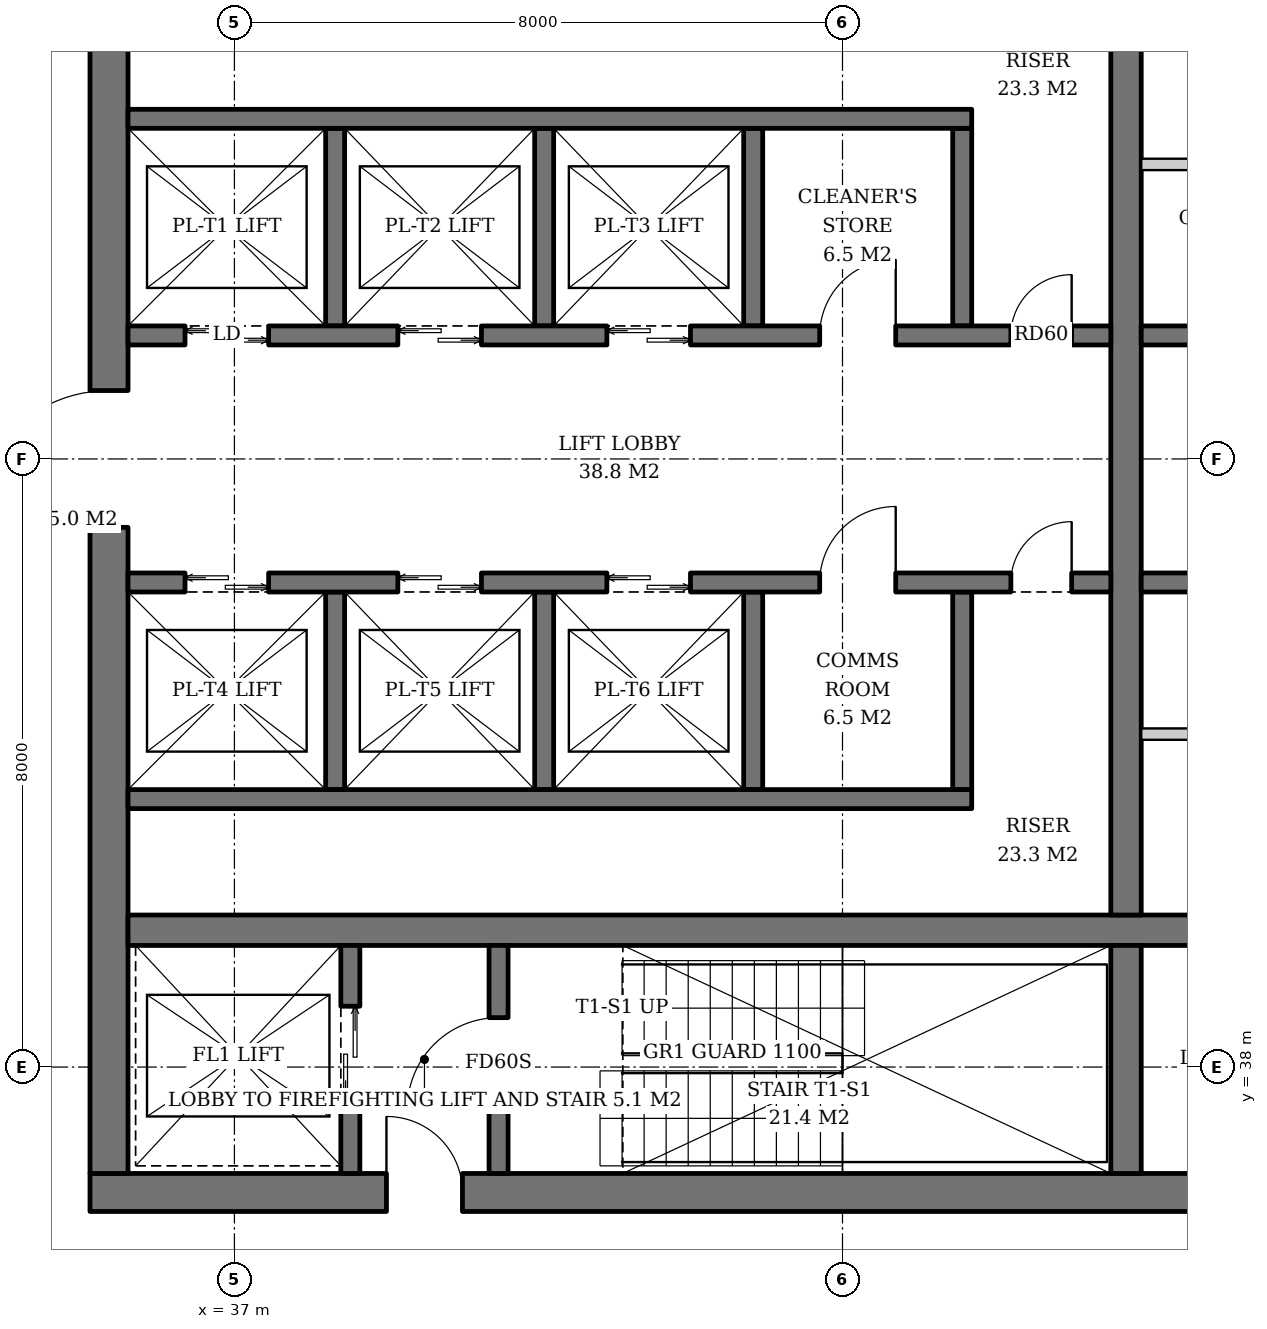
"""IFC4 building model, lengths in metres.
Left out: names, types, materials, properties, quantities, classifications, styles, units other than length and angle.
Written with IfcOpenShell. Run it as: python <this file> out.ifc"""

import sys

from ifc_helpers import new_model, si_unit, direction, frame, frame_2d, origin, place, context, subcontext, project, spatial, rectangle, extrude, element, fill, save


model = new_model("IFC4")
c1 = context("Model", 3, precision=1e-05, world=origin(), true_north=direction((0.0, 1.0)))
c2 = subcontext(c1, "Body", "Model", "MODEL_VIEW")
j1 = project(units=[si_unit("LENGTHUNIT", "METRE"), si_unit("PLANEANGLEUNIT", "RADIAN")], contexts=[c1])
p1 = place(None, origin())
s1 = spatial("IfcSite", under=j1, at=p1, CompositionType="ELEMENT")
p2 = place(p1, origin())
s2 = spatial("IfcBuilding", under=s1, at=p2, CompositionType="ELEMENT")
p3 = place(p2, frame((0.0, 0.0, 283.2)))
s3 = spatial("IfcBuildingStorey", under=s2, at=p3, CompositionType="ELEMENT", Elevation=283.2)
p4 = place(p3, frame((35.1, 36.35, 0.0), z_axis=(0.0, 0.0, 1.0), x_axis=(1.0, 0.0, 0.0)))
e1 = element("IfcWall", 1, at=p4, inside=s3, PredefinedType="SHEAR", context=c2, shape_type="SweptSolid", body=[
    extrude(rectangle(XDim=19.8, YDim=0.5, at=frame_2d((9.9, 0.0))), origin(), (0.0, 0.0, 1.0), 3.8),
])
p5 = place(p4, frame((3.9, 0.0, 0.0)))
e2 = element("IfcOpeningElement", 2, at=p5, cuts=e1, PredefinedType="OPENING", context=c2, shape_type="SweptSolid", body=[
    extrude(rectangle(XDim=1.0, YDim=2.1, at=frame_2d((0.5, 1.05))), frame((0.0, 0.26, 0.0), z_axis=(0.0, -1.0, 0.0), x_axis=(1.0, 0.0, 0.0)), (0.0, 0.0, 1.0), 0.52),
])
p6 = place(p4, frame((15.35, 0.0, 0.0)))
e3 = element("IfcOpeningElement", 3, at=p6, cuts=e1, PredefinedType="OPENING", context=c2, shape_type="SweptSolid", body=[
    extrude(rectangle(XDim=1.0, YDim=2.1, at=frame_2d((0.5, 1.05))), frame((0.0, 0.26, 0.0), z_axis=(0.0, -1.0, 0.0), x_axis=(1.0, 0.0, 0.0)), (0.0, 0.0, 1.0), 0.52),
])
p7 = place(p3, frame((35.35, 36.6, 0.0), z_axis=(0.0, 0.0, 1.0), x_axis=(0.0, 1.0, 0.0)))
e4 = element("IfcWall", 4, at=p7, inside=s3, PredefinedType="SHEAR", context=c2, shape_type="SweptSolid", body=[
    extrude(rectangle(XDim=18.8, YDim=0.5, at=frame_2d((9.4, 0.0))), origin(), (0.0, 0.0, 1.0), 3.8),
])
p8 = place(p7, frame((8.5, 0.0, 0.0)))
e5 = element("IfcOpeningElement", 5, at=p8, cuts=e4, PredefinedType="OPENING", context=c2, shape_type="SweptSolid", body=[
    extrude(rectangle(XDim=1.8, YDim=2.4, at=frame_2d((0.9, 1.2))), frame((0.0, 0.26, 0.0), z_axis=(0.0, -1.0, 0.0), x_axis=(1.0, 0.0, 0.0)), (0.0, 0.0, 1.0), 0.52),
])
p9 = place(p3, frame((35.6, 39.8, 0.0), z_axis=(0.0, 0.0, 1.0), x_axis=(1.0, 0.0, 0.0)))
e6 = element("IfcWall", 6, at=p9, inside=s3, PredefinedType="SHEAR", context=c2, shape_type="SweptSolid", body=[
    extrude(rectangle(XDim=18.8, YDim=0.4, at=frame_2d((9.4, 0.0))), origin(), (0.0, 0.0, 1.0), 3.8),
])
p10 = place(p3, frame((48.73, 36.6, 0.0), z_axis=(0.0, 0.0, 1.0), x_axis=(0.0, 1.0, 0.0)))
e7 = element("IfcWall", 7, at=p10, inside=s3, PredefinedType="SHEAR", context=c2, shape_type="SweptSolid", body=[
    extrude(rectangle(XDim=3.0, YDim=0.4, at=frame_2d((1.5, 0.0))), origin(), (0.0, 0.0, 1.0), 3.8),
])
p11 = place(p3, frame((48.73, 40.0, 0.0), z_axis=(0.0, 0.0, 1.0), x_axis=(0.0, 1.0, 0.0)))
e8 = element("IfcWall", 8, at=p11, inside=s3, PredefinedType="SHEAR", context=c2, shape_type="SweptSolid", body=[
    extrude(rectangle(XDim=12.0, YDim=0.4, at=frame_2d((6.0, 0.0))), origin(), (0.0, 0.0, 1.0), 3.8),
])
p12 = place(p3, frame((38.525, 36.6, 0.0), z_axis=(0.0, 0.0, 1.0), x_axis=(0.0, 1.0, 0.0)))
e9 = element("IfcWall", 9, at=p12, inside=s3, PredefinedType="SHEAR", context=c2, shape_type="SweptSolid", body=[
    extrude(rectangle(XDim=3.0, YDim=0.25, at=frame_2d((1.5, 0.0))), origin(), (0.0, 0.0, 1.0), 3.8),
])
p13 = place(p12, frame((0.9, 0.0, 0.0)))
e10 = element("IfcOpeningElement", 10, at=p13, cuts=e9, PredefinedType="OPENING", context=c2, shape_type="SweptSolid", body=[
    extrude(rectangle(XDim=1.3, YDim=2.2, at=frame_2d((0.65, 1.1))), frame((0.0, 0.135, 0.0), z_axis=(0.0, -1.0, 0.0), x_axis=(1.0, 0.0, 0.0)), (0.0, 0.0, 1.0), 0.27),
])
p14 = place(p3, frame((40.475, 36.6, 0.0), z_axis=(0.0, 0.0, 1.0), x_axis=(0.0, 1.0, 0.0)))
e11 = element("IfcWall", 11, at=p14, inside=s3, PredefinedType="SHEAR", context=c2, shape_type="SweptSolid", body=[
    extrude(rectangle(XDim=3.0, YDim=0.25, at=frame_2d((1.5, 0.0))), origin(), (0.0, 0.0, 1.0), 3.8),
])
p15 = place(p14, frame((0.85, 0.0, 0.0)))
e12 = element("IfcOpeningElement", 12, at=p15, cuts=e11, PredefinedType="OPENING", context=c2, shape_type="SweptSolid", body=[
    extrude(rectangle(XDim=1.2, YDim=2.1, at=frame_2d((0.6, 1.05))), frame((0.0, 0.135, 0.0), z_axis=(0.0, -1.0, 0.0), x_axis=(1.0, 0.0, 0.0)), (0.0, 0.0, 1.0), 0.27),
])
for number, where, z_axis, x_axis in (
    (13, (38.325, 47.75, 0.0), (0.0, 0.0, 1.0), (0.0, 1.0, 0.0)),
    (14, (41.075, 47.75, 0.0), (0.0, 0.0, 1.0), (0.0, 1.0, 0.0)),
    (15, (43.825, 47.75, 0.0), (0.0, 0.0, 1.0), (0.0, 1.0, 0.0)),
    (16, (46.575, 47.75, 0.0), (0.0, 0.0, 1.0), (0.0, 1.0, 0.0)),
):
    element("IfcWall", number, at=place(p3, frame(where, z_axis=z_axis, x_axis=x_axis)), inside=s3, PredefinedType="SHEAR", context=c2, shape_type="SweptSolid", body=[
        extrude(rectangle(XDim=2.6, YDim=0.25, at=frame_2d((1.3, 0.0))), origin(), (0.0, 0.0, 1.0), 3.8),
    ])
p16 = place(p3, frame((35.6, 50.475, 0.0), z_axis=(0.0, 0.0, 1.0), x_axis=(1.0, 0.0, 0.0)))
e17 = element("IfcWall", 17, at=p16, inside=s3, PredefinedType="SHEAR", context=c2, shape_type="SweptSolid", body=[
    extrude(rectangle(XDim=11.1, YDim=0.25, at=frame_2d((5.55, 0.0))), origin(), (0.0, 0.0, 1.0), 3.8),
])
p17 = place(p3, frame((35.6, 47.625, 0.0), z_axis=(0.0, 0.0, 1.0), x_axis=(1.0, 0.0, 0.0)))
e18 = element("IfcWall", 18, at=p17, inside=s3, PredefinedType="SHEAR", context=c2, shape_type="SweptSolid", body=[
    extrude(rectangle(XDim=12.93, YDim=0.25, at=frame_2d((6.465, 0.0))), origin(), (0.0, 0.0, 1.0), 3.8),
])
p18 = place(p17, frame((0.75, 0.0, 0.0)))
e19 = element("IfcOpeningElement", 19, at=p18, cuts=e18, PredefinedType="OPENING", context=c2, shape_type="SweptSolid", body=[
    extrude(rectangle(XDim=1.1, YDim=2.2, at=frame_2d((0.55, 1.1))), frame((0.0, 0.135, 0.0), z_axis=(0.0, -1.0, 0.0), x_axis=(1.0, 0.0, 0.0)), (0.0, 0.0, 1.0), 0.27),
])
p19 = place(p17, frame((3.55, 0.0, 0.0)))
e20 = element("IfcOpeningElement", 20, at=p19, cuts=e18, PredefinedType="OPENING", context=c2, shape_type="SweptSolid", body=[
    extrude(rectangle(XDim=1.1, YDim=2.2, at=frame_2d((0.55, 1.1))), frame((0.0, 0.135, 0.0), z_axis=(0.0, -1.0, 0.0), x_axis=(1.0, 0.0, 0.0)), (0.0, 0.0, 1.0), 0.27),
])
p20 = place(p17, frame((6.3, 0.0, 0.0)))
e21 = element("IfcOpeningElement", 21, at=p20, cuts=e18, PredefinedType="OPENING", context=c2, shape_type="SweptSolid", body=[
    extrude(rectangle(XDim=1.1, YDim=2.2, at=frame_2d((0.55, 1.1))), frame((0.0, 0.135, 0.0), z_axis=(0.0, -1.0, 0.0), x_axis=(1.0, 0.0, 0.0)), (0.0, 0.0, 1.0), 0.27),
])
p21 = place(p17, frame((9.1, 0.0, 0.0)))
e22 = element("IfcOpeningElement", 22, at=p21, cuts=e18, PredefinedType="OPENING", context=c2, shape_type="SweptSolid", body=[
    extrude(rectangle(XDim=1.0, YDim=2.1, at=frame_2d((0.5, 1.05))), frame((0.0, 0.135, 0.0), z_axis=(0.0, -1.0, 0.0), x_axis=(1.0, 0.0, 0.0)), (0.0, 0.0, 1.0), 0.27),
])
p22 = place(p17, frame((11.615, 0.0, 0.0)))
e23 = element("IfcOpeningElement", 23, at=p22, cuts=e18, PredefinedType="OPENING", context=c2, shape_type="SweptSolid", body=[
    extrude(rectangle(XDim=0.8, YDim=2.0, at=frame_2d((0.4, 1.0))), frame((0.0, 0.135, 0.0), z_axis=(0.0, -1.0, 0.0), x_axis=(1.0, 0.0, 0.0)), (0.0, 0.0, 1.0), 0.27),
])
for number, where, z_axis, x_axis in (
    (24, (38.325, 44.25, 0.0), (0.0, 0.0, 1.0), (0.0, -1.0, 0.0)),
    (25, (41.075, 44.25, 0.0), (0.0, 0.0, 1.0), (0.0, -1.0, 0.0)),
    (26, (43.825, 44.25, 0.0), (0.0, 0.0, 1.0), (0.0, -1.0, 0.0)),
    (27, (46.575, 44.25, 0.0), (0.0, 0.0, 1.0), (0.0, -1.0, 0.0)),
):
    element("IfcWall", number, at=place(p3, frame(where, z_axis=z_axis, x_axis=x_axis)), inside=s3, PredefinedType="SHEAR", context=c2, shape_type="SweptSolid", body=[
        extrude(rectangle(XDim=2.6, YDim=0.25, at=frame_2d((1.3, 0.0))), origin(), (0.0, 0.0, 1.0), 3.8),
    ])
p23 = place(p3, frame((35.6, 41.525, 0.0), z_axis=(0.0, 0.0, 1.0), x_axis=(1.0, 0.0, 0.0)))
e28 = element("IfcWall", 28, at=p23, inside=s3, PredefinedType="SHEAR", context=c2, shape_type="SweptSolid", body=[
    extrude(rectangle(XDim=11.1, YDim=0.25, at=frame_2d((5.55, 0.0))), origin(), (0.0, 0.0, 1.0), 3.8),
])
p24 = place(p3, frame((35.6, 44.375, 0.0), z_axis=(0.0, 0.0, 1.0), x_axis=(1.0, 0.0, 0.0)))
e29 = element("IfcWall", 29, at=p24, inside=s3, PredefinedType="SHEAR", context=c2, shape_type="SweptSolid", body=[
    extrude(rectangle(XDim=12.93, YDim=0.25, at=frame_2d((6.465, 0.0))), origin(), (0.0, 0.0, 1.0), 3.8),
])
p25 = place(p24, frame((0.75, 0.0, 0.0)))
e30 = element("IfcOpeningElement", 30, at=p25, cuts=e29, PredefinedType="OPENING", context=c2, shape_type="SweptSolid", body=[
    extrude(rectangle(XDim=1.1, YDim=2.2, at=frame_2d((0.55, 1.1))), frame((0.0, 0.135, 0.0), z_axis=(0.0, -1.0, 0.0), x_axis=(1.0, 0.0, 0.0)), (0.0, 0.0, 1.0), 0.27),
])
p26 = place(p24, frame((3.55, 0.0, 0.0)))
e31 = element("IfcOpeningElement", 31, at=p26, cuts=e29, PredefinedType="OPENING", context=c2, shape_type="SweptSolid", body=[
    extrude(rectangle(XDim=1.1, YDim=2.2, at=frame_2d((0.55, 1.1))), frame((0.0, 0.135, 0.0), z_axis=(0.0, -1.0, 0.0), x_axis=(1.0, 0.0, 0.0)), (0.0, 0.0, 1.0), 0.27),
])
p27 = place(p24, frame((6.3, 0.0, 0.0)))
e32 = element("IfcOpeningElement", 32, at=p27, cuts=e29, PredefinedType="OPENING", context=c2, shape_type="SweptSolid", body=[
    extrude(rectangle(XDim=1.1, YDim=2.2, at=frame_2d((0.55, 1.1))), frame((0.0, 0.135, 0.0), z_axis=(0.0, -1.0, 0.0), x_axis=(1.0, 0.0, 0.0)), (0.0, 0.0, 1.0), 0.27),
])
p28 = place(p24, frame((9.1, 0.0, 0.0)))
e33 = element("IfcOpeningElement", 33, at=p28, cuts=e29, PredefinedType="OPENING", context=c2, shape_type="SweptSolid", body=[
    extrude(rectangle(XDim=1.0, YDim=2.1, at=frame_2d((0.5, 1.05))), frame((0.0, 0.135, 0.0), z_axis=(0.0, -1.0, 0.0), x_axis=(1.0, 0.0, 0.0)), (0.0, 0.0, 1.0), 0.27),
])
p29 = place(p24, frame((11.615, 0.0, 0.0)))
e34 = element("IfcOpeningElement", 34, at=p29, cuts=e29, PredefinedType="OPENING", context=c2, shape_type="SweptSolid", body=[
    extrude(rectangle(XDim=0.8, YDim=2.0, at=frame_2d((0.4, 1.0))), frame((0.0, 0.135, 0.0), z_axis=(0.0, -1.0, 0.0), x_axis=(1.0, 0.0, 0.0)), (0.0, 0.0, 1.0), 0.27),
])
p30 = place(p3, frame((48.93, 47.625, 0.0), z_axis=(0.0, 0.0, 1.0), x_axis=(1.0, 0.0, 0.0)))
e35 = element("IfcWall", 35, at=p30, inside=s3, PredefinedType="SHEAR", context=c2, shape_type="SweptSolid", body=[
    extrude(rectangle(XDim=5.47, YDim=0.25, at=frame_2d((2.735, 0.0))), origin(), (0.0, 0.0, 1.0), 3.8),
])
p31 = place(p30, frame((0.78, 0.0, 0.0)))
e36 = element("IfcOpeningElement", 36, at=p31, cuts=e35, PredefinedType="OPENING", context=c2, shape_type="SweptSolid", body=[
    extrude(rectangle(XDim=1.0, YDim=2.1, at=frame_2d((0.5, 1.05))), frame((0.0, 0.135, 0.0), z_axis=(0.0, -1.0, 0.0), x_axis=(1.0, 0.0, 0.0)), (0.0, 0.0, 1.0), 0.27),
])
p32 = place(p30, frame((3.64, 0.0, 0.0)))
e37 = element("IfcOpeningElement", 37, at=p32, cuts=e35, PredefinedType="OPENING", context=c2, shape_type="SweptSolid", body=[
    extrude(rectangle(XDim=1.0, YDim=2.1, at=frame_2d((0.5, 1.05))), frame((0.0, 0.135, 0.0), z_axis=(0.0, -1.0, 0.0), x_axis=(1.0, 0.0, 0.0)), (0.0, 0.0, 1.0), 0.27),
])
p33 = place(p3, frame((48.93, 44.375, 0.0), z_axis=(0.0, 0.0, 1.0), x_axis=(1.0, 0.0, 0.0)))
e38 = element("IfcWall", 38, at=p33, inside=s3, PredefinedType="SHEAR", context=c2, shape_type="SweptSolid", body=[
    extrude(rectangle(XDim=5.47, YDim=0.25, at=frame_2d((2.735, 0.0))), origin(), (0.0, 0.0, 1.0), 3.8),
])
p34 = place(p33, frame((0.78, 0.0, 0.0)))
e39 = element("IfcOpeningElement", 39, at=p34, cuts=e38, PredefinedType="OPENING", context=c2, shape_type="SweptSolid", body=[
    extrude(rectangle(XDim=1.0, YDim=2.1, at=frame_2d((0.5, 1.05))), frame((0.0, 0.135, 0.0), z_axis=(0.0, -1.0, 0.0), x_axis=(1.0, 0.0, 0.0)), (0.0, 0.0, 1.0), 0.27),
])
p35 = place(p33, frame((3.64, 0.0, 0.0)))
e40 = element("IfcOpeningElement", 40, at=p35, cuts=e38, PredefinedType="OPENING", context=c2, shape_type="SweptSolid", body=[
    extrude(rectangle(XDim=1.0, YDim=2.1, at=frame_2d((0.5, 1.05))), frame((0.0, 0.135, 0.0), z_axis=(0.0, -1.0, 0.0), x_axis=(1.0, 0.0, 0.0)), (0.0, 0.0, 1.0), 0.27),
])
p36 = place(p3, frame((48.93, 49.875, 0.0), z_axis=(0.0, 0.0, 1.0), x_axis=(1.0, 0.0, 0.0)))
e41 = element("IfcWall", 41, at=p36, inside=s3, PredefinedType="SOLIDWALL", context=c2, shape_type="SweptSolid", body=[
    extrude(rectangle(XDim=2.56, YDim=0.15, at=frame_2d((1.28, 0.0))), origin(), (0.0, 0.0, 1.0), 3.6),
])
p37 = place(p36, frame((0.78, 0.0, 0.0)))
e42 = element("IfcOpeningElement", 42, at=p37, cuts=e41, PredefinedType="OPENING", context=c2, shape_type="SweptSolid", body=[
    extrude(rectangle(XDim=1.0, YDim=2.1, at=frame_2d((0.5, 1.05))), frame((0.0, 0.085, 0.0), z_axis=(0.0, -1.0, 0.0), x_axis=(1.0, 0.0, 0.0)), (0.0, 0.0, 1.0), 0.17),
])
p38 = place(p3, frame((48.93, 42.38, 0.0), z_axis=(0.0, 0.0, 1.0), x_axis=(1.0, 0.0, 0.0)))
e43 = element("IfcWall", 43, at=p38, inside=s3, PredefinedType="SOLIDWALL", context=c2, shape_type="SweptSolid", body=[
    extrude(rectangle(XDim=2.56, YDim=0.15, at=frame_2d((1.28, 0.0))), origin(), (0.0, 0.0, 1.0), 3.6),
])
p39 = place(p38, frame((0.78, 0.0, 0.0)))
e44 = element("IfcOpeningElement", 44, at=p39, cuts=e43, PredefinedType="OPENING", context=c2, shape_type="SweptSolid", body=[
    extrude(rectangle(XDim=1.0, YDim=2.1, at=frame_2d((0.5, 1.05))), frame((0.0, 0.085, 0.0), z_axis=(0.0, -1.0, 0.0), x_axis=(1.0, 0.0, 0.0)), (0.0, 0.0, 1.0), 0.17),
])
p40 = place(p13, origin())
e45 = element("IfcDoor", 45, at=p40, inside=s3, OperationType="DOUBLE_DOOR_SLIDING", PredefinedType="DOOR", context=c2, shape_type="SweptSolid", body=[
    extrude(rectangle(XDim=1.3, YDim=2.2, at=frame_2d((0.65, 1.1))), frame((0.0, 0.025, 0.0), z_axis=(0.0, -1.0, 0.0), x_axis=(1.0, 0.0, 0.0)), (0.0, 0.0, 1.0), 0.05),
])
fill(e10, e45)
p41 = place(p15, origin())
e46 = element("IfcDoor", 46, at=p41, inside=s3, OperationType="SINGLE_SWING_LEFT", PredefinedType="DOOR", context=c2, shape_type="SweptSolid", body=[
    extrude(rectangle(XDim=1.2, YDim=2.1, at=frame_2d((0.6, 1.05))), frame((0.0, 0.025, 0.0), z_axis=(0.0, -1.0, 0.0), x_axis=(1.0, 0.0, 0.0)), (0.0, 0.0, 1.0), 0.05),
])
fill(e12, e46)
p42 = place(p18, origin())
e47 = element("IfcDoor", 47, at=p42, inside=s3, OperationType="DOUBLE_DOOR_SLIDING", PredefinedType="DOOR", context=c2, shape_type="SweptSolid", body=[
    extrude(rectangle(XDim=1.1, YDim=2.2, at=frame_2d((0.55, 1.1))), frame((0.0, 0.025, 0.0), z_axis=(0.0, -1.0, 0.0), x_axis=(1.0, 0.0, 0.0)), (0.0, 0.0, 1.0), 0.05),
])
fill(e19, e47)
p43 = place(p19, origin())
e48 = element("IfcDoor", 48, at=p43, inside=s3, OperationType="DOUBLE_DOOR_SLIDING", PredefinedType="DOOR", context=c2, shape_type="SweptSolid", body=[
    extrude(rectangle(XDim=1.1, YDim=2.2, at=frame_2d((0.55, 1.1))), frame((0.0, 0.025, 0.0), z_axis=(0.0, -1.0, 0.0), x_axis=(1.0, 0.0, 0.0)), (0.0, 0.0, 1.0), 0.05),
])
fill(e20, e48)
p44 = place(p20, origin())
e49 = element("IfcDoor", 49, at=p44, inside=s3, OperationType="DOUBLE_DOOR_SLIDING", PredefinedType="DOOR", context=c2, shape_type="SweptSolid", body=[
    extrude(rectangle(XDim=1.1, YDim=2.2, at=frame_2d((0.55, 1.1))), frame((0.0, 0.025, 0.0), z_axis=(0.0, -1.0, 0.0), x_axis=(1.0, 0.0, 0.0)), (0.0, 0.0, 1.0), 0.05),
])
fill(e21, e49)
p45 = place(p21, origin())
e50 = element("IfcDoor", 50, at=p45, inside=s3, OperationType="SINGLE_SWING_RIGHT", PredefinedType="DOOR", context=c2, shape_type="SweptSolid", body=[
    extrude(rectangle(XDim=1.0, YDim=2.1, at=frame_2d((0.5, 1.05))), frame((0.0, 0.025, 0.0), z_axis=(0.0, -1.0, 0.0), x_axis=(1.0, 0.0, 0.0)), (0.0, 0.0, 1.0), 0.05),
])
fill(e22, e50)
p46 = place(p22, origin())
e51 = element("IfcDoor", 51, at=p46, inside=s3, OperationType="SINGLE_SWING_RIGHT", PredefinedType="DOOR", context=c2, shape_type="SweptSolid", body=[
    extrude(rectangle(XDim=0.8, YDim=2.0, at=frame_2d((0.4, 1.0))), frame((0.0, 0.025, 0.0), z_axis=(0.0, -1.0, 0.0), x_axis=(1.0, 0.0, 0.0)), (0.0, 0.0, 1.0), 0.05),
])
fill(e23, e51)
p47 = place(p25, origin())
e52 = element("IfcDoor", 52, at=p47, inside=s3, OperationType="DOUBLE_DOOR_SLIDING", PredefinedType="DOOR", context=c2, shape_type="SweptSolid", body=[
    extrude(rectangle(XDim=1.1, YDim=2.2, at=frame_2d((0.55, 1.1))), frame((0.0, 0.025, 0.0), z_axis=(0.0, -1.0, 0.0), x_axis=(1.0, 0.0, 0.0)), (0.0, 0.0, 1.0), 0.05),
])
fill(e30, e52)
p48 = place(p26, origin())
e53 = element("IfcDoor", 53, at=p48, inside=s3, OperationType="DOUBLE_DOOR_SLIDING", PredefinedType="DOOR", context=c2, shape_type="SweptSolid", body=[
    extrude(rectangle(XDim=1.1, YDim=2.2, at=frame_2d((0.55, 1.1))), frame((0.0, 0.025, 0.0), z_axis=(0.0, -1.0, 0.0), x_axis=(1.0, 0.0, 0.0)), (0.0, 0.0, 1.0), 0.05),
])
fill(e31, e53)
p49 = place(p27, origin())
e54 = element("IfcDoor", 54, at=p49, inside=s3, OperationType="DOUBLE_DOOR_SLIDING", PredefinedType="DOOR", context=c2, shape_type="SweptSolid", body=[
    extrude(rectangle(XDim=1.1, YDim=2.2, at=frame_2d((0.55, 1.1))), frame((0.0, 0.025, 0.0), z_axis=(0.0, -1.0, 0.0), x_axis=(1.0, 0.0, 0.0)), (0.0, 0.0, 1.0), 0.05),
])
fill(e32, e54)
p50 = place(p28, origin())
e55 = element("IfcDoor", 55, at=p50, inside=s3, OperationType="SINGLE_SWING_RIGHT", PredefinedType="DOOR", context=c2, shape_type="SweptSolid", body=[
    extrude(rectangle(XDim=1.0, YDim=2.1, at=frame_2d((0.5, 1.05))), frame((0.0, 0.025, 0.0), z_axis=(0.0, -1.0, 0.0), x_axis=(1.0, 0.0, 0.0)), (0.0, 0.0, 1.0), 0.05),
])
fill(e33, e55)
p51 = place(p29, origin())
e56 = element("IfcDoor", 56, at=p51, inside=s3, OperationType="SINGLE_SWING_RIGHT", PredefinedType="DOOR", context=c2, shape_type="SweptSolid", body=[
    extrude(rectangle(XDim=0.8, YDim=2.0, at=frame_2d((0.4, 1.0))), frame((0.0, 0.025, 0.0), z_axis=(0.0, -1.0, 0.0), x_axis=(1.0, 0.0, 0.0)), (0.0, 0.0, 1.0), 0.05),
])
fill(e34, e56)
p52 = place(p5, origin())
e57 = element("IfcDoor", 57, at=p52, inside=s3, OperationType="SINGLE_SWING_LEFT", PredefinedType="DOOR", context=c2, shape_type="SweptSolid", body=[
    extrude(rectangle(XDim=1.0, YDim=2.1, at=frame_2d((0.5, 1.05))), frame((0.0, 0.025, 0.0), z_axis=(0.0, -1.0, 0.0), x_axis=(1.0, 0.0, 0.0)), (0.0, 0.0, 1.0), 0.05),
])
fill(e2, e57)
p53 = place(p8, origin())
e58 = element("IfcDoor", 58, at=p53, inside=s3, OperationType="DOUBLE_DOOR_SINGLE_SWING", PredefinedType="DOOR", context=c2, shape_type="SweptSolid", body=[
    extrude(rectangle(XDim=1.8, YDim=2.4, at=frame_2d((0.9, 1.2))), frame((0.0, 0.025, 0.0), z_axis=(0.0, -1.0, 0.0), x_axis=(1.0, 0.0, 0.0)), (0.0, 0.0, 1.0), 0.05),
])
fill(e5, e58)
save(model, sys.argv[1])
